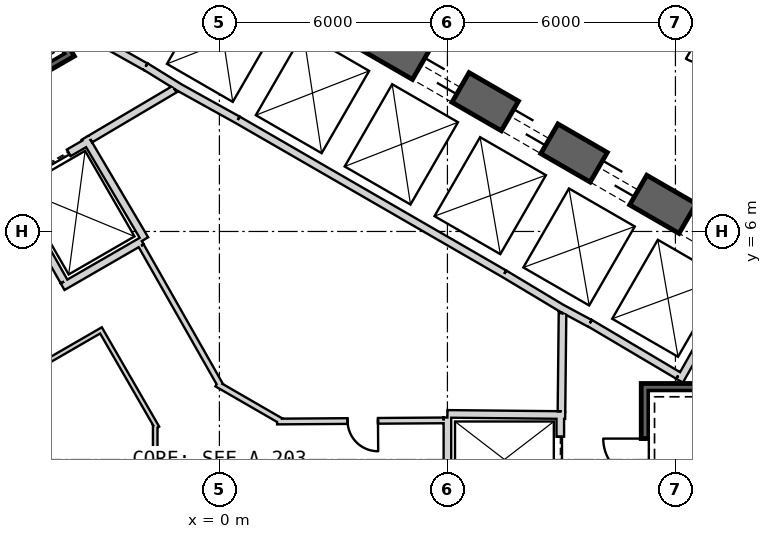
"""IFC4 building model, lengths in metres.
Left out: names, types, materials, properties, quantities, classifications, styles, units other than length and angle.
Written with IfcOpenShell. Run it as: python <this file> out.ifc"""

import sys

from ifc_helpers import new_model, si_unit, direction, frame, frame_2d, origin, place, context, subcontext, project, spatial, rectangle, extrude, element, fill, save


model = new_model("IFC4")
c1 = context("Model", 3, precision=1e-05, world=origin(), true_north=direction((0.0, 1.0)))
c2 = subcontext(c1, "Body", "Model", "MODEL_VIEW")
j1 = project(units=[si_unit("LENGTHUNIT", "METRE"), si_unit("PLANEANGLEUNIT", "RADIAN")], contexts=[c1])
p1 = place(None, origin())
s1 = spatial("IfcSite", under=j1, at=p1, CompositionType="ELEMENT")
p2 = place(p1, origin())
s2 = spatial("IfcBuilding", under=s1, at=p2, CompositionType="ELEMENT")
p3 = place(p2, origin())
s3 = spatial("IfcBuildingStorey", under=s2, at=p3, CompositionType="ELEMENT", Elevation=0.0)
p4 = place(p3, frame((19.475, 2.208, 0.0), z_axis=(0.0, 0.0, 1.0), x_axis=(-0.866028369851, 0.499994862586, 0.0)))
e1 = element("IfcWall", 1, at=p4, inside=s3, PredefinedType="SHEAR", context=c2, shape_type="SweptSolid", body=[
    extrude(rectangle(XDim=31.523, YDim=0.9, at=frame_2d((15.762, 0.0))), origin(), (0.0, 0.0, 1.0), 9.0),
])
p5 = place(p4, frame((7.062, 0.0, 0.0)))
e2 = element("IfcOpeningElement", 2, at=p5, cuts=e1, PredefinedType="OPENING", context=c2, shape_type="SweptSolid", body=[
    extrude(rectangle(XDim=1.2, YDim=2.4, at=frame_2d((0.6, 1.2))), frame((0.0, 0.46, 0.0), z_axis=(0.0, -1.0, 0.0), x_axis=(1.0, 0.0, 0.0)), (0.0, 0.0, 1.0), 0.92),
])
p6 = place(p4, frame((9.762, 0.0, 0.0)))
e3 = element("IfcOpeningElement", 3, at=p6, cuts=e1, PredefinedType="OPENING", context=c2, shape_type="SweptSolid", body=[
    extrude(rectangle(XDim=1.2, YDim=2.4, at=frame_2d((0.6, 1.2))), frame((0.0, 0.46, 0.0), z_axis=(0.0, -1.0, 0.0), x_axis=(1.0, 0.0, 0.0)), (0.0, 0.0, 1.0), 0.92),
])
p7 = place(p4, frame((12.462, 0.0, 0.0)))
e4 = element("IfcOpeningElement", 4, at=p7, cuts=e1, PredefinedType="OPENING", context=c2, shape_type="SweptSolid", body=[
    extrude(rectangle(XDim=1.2, YDim=2.4, at=frame_2d((0.6, 1.2))), frame((0.0, 0.46, 0.0), z_axis=(0.0, -1.0, 0.0), x_axis=(1.0, 0.0, 0.0)), (0.0, 0.0, 1.0), 0.92),
])
p8 = place(p4, frame((15.162, 0.0, 0.0)))
e5 = element("IfcOpeningElement", 5, at=p8, cuts=e1, PredefinedType="OPENING", context=c2, shape_type="SweptSolid", body=[
    extrude(rectangle(XDim=1.2, YDim=2.4, at=frame_2d((0.6, 1.2))), frame((0.0, 0.46, 0.0), z_axis=(0.0, -1.0, 0.0), x_axis=(1.0, 0.0, 0.0)), (0.0, 0.0, 1.0), 0.92),
])
p9 = place(p4, frame((17.862, 0.0, 0.0)))
e6 = element("IfcOpeningElement", 6, at=p9, cuts=e1, PredefinedType="OPENING", context=c2, shape_type="SweptSolid", body=[
    extrude(rectangle(XDim=1.2, YDim=2.4, at=frame_2d((0.6, 1.2))), frame((0.0, 0.46, 0.0), z_axis=(0.0, -1.0, 0.0), x_axis=(1.0, 0.0, 0.0)), (0.0, 0.0, 1.0), 0.92),
])
p10 = place(p4, frame((20.562, 0.0, 0.0)))
e7 = element("IfcOpeningElement", 7, at=p10, cuts=e1, PredefinedType="OPENING", context=c2, shape_type="SweptSolid", body=[
    extrude(rectangle(XDim=1.2, YDim=2.4, at=frame_2d((0.6, 1.2))), frame((0.0, 0.46, 0.0), z_axis=(0.0, -1.0, 0.0), x_axis=(1.0, 0.0, 0.0)), (0.0, 0.0, 1.0), 0.92),
])
p11 = place(p4, frame((23.262, 0.0, 0.0)))
e8 = element("IfcOpeningElement", 8, at=p11, cuts=e1, PredefinedType="OPENING", context=c2, shape_type="SweptSolid", body=[
    extrude(rectangle(XDim=1.2, YDim=2.4, at=frame_2d((0.6, 1.2))), frame((0.0, 0.46, 0.0), z_axis=(0.0, -1.0, 0.0), x_axis=(1.0, 0.0, 0.0)), (0.0, 0.0, 1.0), 0.92),
])
p12 = place(p4, frame((3.612, 0.0, 0.0)))
e9 = element("IfcOpeningElement", 9, at=p12, cuts=e1, PredefinedType="OPENING", context=c2, shape_type="SweptSolid", body=[
    extrude(rectangle(XDim=1.2, YDim=2.4, at=frame_2d((0.6, 1.2))), frame((0.0, 0.46, 0.0), z_axis=(0.0, -1.0, 0.0), x_axis=(1.0, 0.0, 0.0)), (0.0, 0.0, 1.0), 0.92),
])
p13 = place(p4, frame((26.712, 0.0, 0.0)))
e10 = element("IfcOpeningElement", 10, at=p13, cuts=e1, PredefinedType="OPENING", context=c2, shape_type="SweptSolid", body=[
    extrude(rectangle(XDim=1.2, YDim=2.4, at=frame_2d((0.6, 1.2))), frame((0.0, 0.46, 0.0), z_axis=(0.0, -1.0, 0.0), x_axis=(1.0, 0.0, 0.0)), (0.0, 0.0, 1.0), 0.92),
])
p14 = place(p3, frame((7.497, 4.886, 0.0), z_axis=(0.0, 0.0, 1.0), x_axis=(-0.866030989016, 0.499990325971, 0.0)))
e11 = element("IfcWall", 11, at=p14, inside=s3, PredefinedType="PLUMBINGWALL", context=c2, shape_type="SweptSolid", body=[
    extrude(rectangle(XDim=8.1, YDim=0.2, at=frame_2d((4.05, 0.0))), origin(), (0.0, 0.0, 1.0), 8.7),
])
p15 = place(p3, frame((12.11, 2.073, 0.0), z_axis=(0.0, 0.0, 1.0), x_axis=(0.49196600604, 0.870614408852, 0.0)))
e12 = element("IfcWall", 12, at=p15, inside=s3, PredefinedType="PLUMBINGWALL", context=c2, shape_type="SweptSolid", body=[
    extrude(rectangle(XDim=3.35, YDim=0.2, at=frame_2d((1.675, 0.0))), origin(), (0.0, 0.0, 1.0), 8.7),
])
p16 = place(p3, frame((12.073, 2.211, 0.0), z_axis=(0.0, 0.0, 1.0), x_axis=(-0.860438357912, 0.509554542943, 0.0)))
e13 = element("IfcWall", 13, at=p16, inside=s3, PredefinedType="PLUMBINGWALL", context=c2, shape_type="SweptSolid", body=[
    extrude(rectangle(XDim=2.7, YDim=0.2, at=frame_2d((1.35, 0.0))), origin(), (0.0, 0.0, 1.0), 8.7),
])
p17 = place(p3, frame((9.748, 3.583, 0.0), z_axis=(0.0, 0.0, 1.0), x_axis=(-0.880917147855, 0.473270513147, 0.0)))
e14 = element("IfcWall", 14, at=p17, inside=s3, PredefinedType="PLUMBINGWALL", context=c2, shape_type="SweptSolid", body=[
    extrude(rectangle(XDim=0.878, YDim=0.2, at=frame_2d((0.439, 0.0))), origin(), (0.0, 0.0, 1.0), 8.7),
])
p18 = place(p3, frame((9.079, 3.937, 0.0), z_axis=(0.0, 0.0, 1.0), x_axis=(-0.857516281273, 0.51445682749, 0.0)))
e15 = element("IfcWall", 15, at=p18, inside=s3, PredefinedType="PLUMBINGWALL", context=c2, shape_type="SweptSolid", body=[
    extrude(rectangle(XDim=1.845, YDim=0.2, at=frame_2d((0.922, 0.0))), origin(), (0.0, 0.0, 1.0), 8.7),
])
p19 = place(p3, frame((-1.941, 10.339, 0.0), z_axis=(0.0, 0.0, 1.0), x_axis=(0.850216889117, -0.526432561171, 0.0)))
e16 = element("IfcWall", 16, at=p19, inside=s3, PredefinedType="PLUMBINGWALL", context=c2, shape_type="SweptSolid", body=[
    extrude(rectangle(XDim=1.078, YDim=0.2, at=frame_2d((0.539, 0.0))), origin(), (0.0, 0.0, 1.0), 8.7),
])
p20 = place(p3, frame((0.483, 8.936, 0.0), z_axis=(0.0, 0.0, 1.0), x_axis=(-0.874269620932, 0.485440655401, 0.0)))
e17 = element("IfcWall", 17, at=p20, inside=s3, PredefinedType="PLUMBINGWALL", context=c2, shape_type="SweptSolid", body=[
    extrude(rectangle(XDim=1.845, YDim=0.2, at=frame_2d((0.922, 0.0))), origin(), (0.0, 0.0, 1.0), 8.7),
])
p21 = place(p3, frame((-4.296, 11.659, 0.0), z_axis=(0.0, 0.0, 1.0), x_axis=(0.871534483978, -0.490334215854, 0.0)))
e18 = element("IfcWall", 18, at=p21, inside=s3, PredefinedType="PLUMBINGWALL", context=c2, shape_type="SweptSolid", body=[
    extrude(rectangle(XDim=2.7, YDim=0.2, at=frame_2d((1.35, 0.0))), origin(), (0.0, 0.0, 1.0), 8.7),
])
p22 = place(p3, frame((19.2, 1.9, -0.4), z_axis=(0.0, 0.0, 1.0), x_axis=(-1.0, 0.0, 0.0)))
e19 = element("IfcWall", 19, at=p22, inside=s3, PredefinedType="SHEAR", context=c2, shape_type="SweptSolid", body=[
    extrude(rectangle(XDim=8.1, YDim=0.2, at=frame_2d((4.05, 0.0))), origin(), (0.0, 0.0, 1.0), 9.1),
])
p23 = place(p3, frame((11.2, -1.8, -0.4), z_axis=(0.0, 0.0, 1.0), x_axis=(0.0, 1.0, 0.0)))
e20 = element("IfcWall", 20, at=p23, inside=s3, PredefinedType="SHEAR", context=c2, shape_type="SweptSolid", body=[
    extrude(rectangle(XDim=3.6, YDim=0.2, at=frame_2d((1.8, 0.0))), origin(), (0.0, 0.0, 1.0), 9.1),
])
p24 = place(p23, frame((1.25, 0.0, 0.4)))
e21 = element("IfcOpeningElement", 21, at=p24, cuts=e20, PredefinedType="OPENING", context=c2, shape_type="SweptSolid", body=[
    extrude(rectangle(XDim=1.1, YDim=2.1, at=frame_2d((0.55, 1.05))), frame((0.0, 0.11, 0.0), z_axis=(0.0, -1.0, 0.0), x_axis=(1.0, 0.0, 0.0)), (0.0, 0.0, 1.0), 0.22),
])
p25 = place(p3, frame((8.97, 1.2, 0.0), z_axis=(0.0, 0.0, 1.0), x_axis=(0.0, -1.0, 0.0)))
e22 = element("IfcWall", 22, at=p25, inside=s3, PredefinedType="PLUMBINGWALL", context=c2, shape_type="SweptSolid", body=[
    extrude(rectangle(XDim=2.4, YDim=0.2, at=frame_2d((1.2, 0.0))), origin(), (0.0, 0.0, 1.0), 8.7),
])
p26 = place(p25, frame((0.6, 0.0, 0.0)))
e23 = element("IfcOpeningElement", 23, at=p26, cuts=e22, PredefinedType="OPENING", context=c2, shape_type="SweptSolid", body=[
    extrude(rectangle(XDim=1.2, YDim=2.4, at=frame_2d((0.6, 1.2))), frame((0.0, 0.11, 0.0), z_axis=(0.0, -1.0, 0.0), x_axis=(1.0, 0.0, 0.0)), (0.0, 0.0, 1.0), 0.22),
])
p27 = place(p3, frame((6.0, 1.2, 0.0), z_axis=(0.0, 0.0, 1.0), x_axis=(0.999949988, -0.010001074852, 0.0)))
e24 = element("IfcWall", 24, at=p27, inside=s3, PredefinedType="PLUMBINGWALL", context=c2, shape_type="SweptSolid", body=[
    extrude(rectangle(XDim=3.1, YDim=0.2, at=frame_2d((1.55, 0.0))), origin(), (0.0, 0.0, 1.0), 8.7),
])
p28 = place(p3, frame((6.0, -1.1, 0.0), z_axis=(0.0, 0.0, 1.0), x_axis=(0.0, 1.0, 0.0)))
e25 = element("IfcWall", 25, at=p28, inside=s3, PredefinedType="PLUMBINGWALL", context=c2, shape_type="SweptSolid", body=[
    extrude(rectangle(XDim=2.205, YDim=0.2, at=frame_2d((1.102, 0.0))), origin(), (0.0, 0.0, 1.0), 8.7),
])
p29 = place(p3, frame((-7.854, 17.405, -0.4), z_axis=(0.0, 0.0, 1.0), x_axis=(0.499997992926, -0.866026562566, 0.0)))
e26 = element("IfcWall", 26, at=p29, inside=s3, PredefinedType="SHEAR", context=c2, shape_type="SweptSolid", body=[
    extrude(rectangle(XDim=7.9, YDim=0.2, at=frame_2d((3.95, 0.0))), origin(), (0.0, 0.0, 1.0), 9.1),
])
p30 = place(p3, frame((-7.159, 8.8, -0.4), z_axis=(0.0, 0.0, 1.0), x_axis=(0.866047807691, 0.499961193289, 0.0)))
e27 = element("IfcWall", 27, at=p30, inside=s3, PredefinedType="SHEAR", context=c2, shape_type="SweptSolid", body=[
    extrude(rectangle(XDim=3.6, YDim=0.2, at=frame_2d((1.8, 0.0))), origin(), (0.0, 0.0, 1.0), 9.1),
])
p31 = place(p30, frame((1.25, 0.0, 0.4)))
e28 = element("IfcOpeningElement", 28, at=p31, cuts=e27, PredefinedType="OPENING", context=c2, shape_type="SweptSolid", body=[
    extrude(rectangle(XDim=1.1, YDim=2.1, at=frame_2d((0.55, 1.05))), frame((0.0, 0.11, 0.0), z_axis=(0.0, -1.0, 0.0), x_axis=(1.0, 0.0, 0.0)), (0.0, 0.0, 1.0), 0.22),
])
p32 = place(p3, frame((-5.524, 7.168, 0.0), z_axis=(0.0, 0.0, 1.0), x_axis=(0.866024647952, 0.500001309137, 0.0)))
e29 = element("IfcWall", 29, at=p32, inside=s3, PredefinedType="PLUMBINGWALL", context=c2, shape_type="SweptSolid", body=[
    extrude(rectangle(XDim=2.4, YDim=0.2, at=frame_2d((1.2, 0.0))), origin(), (0.0, 0.0, 1.0), 8.7),
])
p33 = place(p32, frame((0.6, 0.0, 0.0)))
e30 = element("IfcOpeningElement", 30, at=p33, cuts=e29, PredefinedType="OPENING", context=c2, shape_type="SweptSolid", body=[
    extrude(rectangle(XDim=1.2, YDim=2.4, at=frame_2d((0.6, 1.2))), frame((0.0, 0.11, 0.0), z_axis=(0.0, -1.0, 0.0), x_axis=(1.0, 0.0, 0.0)), (0.0, 0.0, 1.0), 0.22),
])
p34 = place(p3, frame((-3.538, 8.465, 0.0), z_axis=(0.0, 0.0, 1.0), x_axis=(0.508647062354, -0.860975125052, 0.0)))
e31 = element("IfcWall", 31, at=p34, inside=s3, PredefinedType="PLUMBINGWALL", context=c2, shape_type="SweptSolid", body=[
    extrude(rectangle(XDim=3.1, YDim=0.2, at=frame_2d((1.55, 0.0))), origin(), (0.0, 0.0, 1.0), 8.7),
])
p35 = place(p3, frame((-2.043, 5.748, 0.0), z_axis=(0.0, 0.0, 1.0), x_axis=(-0.866035096217, -0.499983211839, 0.0)))
e32 = element("IfcWall", 32, at=p35, inside=s3, PredefinedType="PLUMBINGWALL", context=c2, shape_type="SweptSolid", body=[
    extrude(rectangle(XDim=2.404, YDim=0.2, at=frame_2d((1.202, 0.0))), origin(), (0.0, 0.0, 1.0), 8.7),
])
p36 = place(p3, frame((-5.562, 7.296, 0.0), z_axis=(0.0, 0.0, 1.0), x_axis=(0.49134651263, -0.870964180966, 0.0)))
e33 = element("IfcWall", 33, at=p36, inside=s3, PredefinedType="PLUMBINGWALL", context=c2, shape_type="SweptSolid", body=[
    extrude(rectangle(XDim=3.0, YDim=0.2, at=frame_2d((1.5, 0.0))), origin(), (0.0, 0.0, 1.0), 8.7),
])
p37 = place(p3, frame((9.001, 1.27, 0.0), z_axis=(0.0, 0.0, 1.0), x_axis=(0.010784614026, 0.999941844359, 0.0)))
e34 = element("IfcWall", 34, at=p37, inside=s3, PredefinedType="PARTITIONING", context=c2, shape_type="SweptSolid", body=[
    extrude(rectangle(XDim=2.581, YDim=0.2, at=frame_2d((1.291, 0.0))), origin(), (0.0, 0.0, 1.0), 8.7),
])
p38 = place(p3, frame((-1.18, 9.744, 0.0), z_axis=(0.0, 0.0, 1.0), x_axis=(-0.860615607571, -0.509255118781, 0.0)))
e35 = element("IfcWall", 35, at=p38, inside=s3, PredefinedType="PARTITIONING", context=c2, shape_type="SweptSolid", body=[
    extrude(rectangle(XDim=2.581, YDim=0.2, at=frame_2d((1.29, 0.0))), origin(), (0.0, 0.0, 1.0), 8.7),
])
p39 = place(p3, frame((1.518, 0.999, 0.0), z_axis=(0.0, 0.0, 1.0), x_axis=(0.999976903524, 0.006796500403, 0.0)))
e36 = element("IfcWall", 36, at=p39, inside=s3, PredefinedType="PLUMBINGWALL", context=c2, shape_type="SweptSolid", body=[
    extrude(rectangle(XDim=4.382, YDim=0.15, at=frame_2d((2.191, 0.0))), origin(), (0.0, 0.0, 1.0), 8.7),
])
p40 = place(p39, frame((1.855, 0.0, 0.0)))
e37 = element("IfcOpeningElement", 37, at=p40, cuts=e36, PredefinedType="OPENING", context=c2, shape_type="SweptSolid", body=[
    extrude(rectangle(XDim=0.8, YDim=2.1, at=frame_2d((0.4, 1.05))), frame((0.0, 0.085, 0.0), z_axis=(0.0, -1.0, 0.0), x_axis=(1.0, 0.0, 0.0)), (0.0, 0.0, 1.0), 0.17),
])
p41 = place(p3, frame((-0.067, 1.989, 0.0), z_axis=(0.0, 0.0, 1.0), x_axis=(0.865981695925, -0.500075696594, 0.0)))
e38 = element("IfcWall", 38, at=p41, inside=s3, PredefinedType="PLUMBINGWALL", context=c2, shape_type="SweptSolid", body=[
    extrude(rectangle(XDim=1.954, YDim=0.15, at=frame_2d((0.977, 0.0))), origin(), (0.0, 0.0, 1.0), 8.7),
])
p42 = place(p3, frame((-2.059, 5.624, 0.0), z_axis=(0.0, 0.0, 1.0), x_axis=(0.494149180773, -0.869377125959, 0.0)))
e39 = element("IfcWall", 39, at=p42, inside=s3, PredefinedType="PLUMBINGWALL", context=c2, shape_type="SweptSolid", body=[
    extrude(rectangle(XDim=4.231, YDim=0.15, at=frame_2d((2.116, 0.0))), origin(), (0.0, 0.0, 1.0), 8.7),
])
p43 = place(p3, frame((-3.064, 3.427, 0.0), z_axis=(0.0, 0.0, 1.0), x_axis=(-0.866087547558, -0.499892348375, 0.0)))
e40 = element("IfcWall", 40, at=p43, inside=s3, PredefinedType="PARTITIONING", context=c2, shape_type="SweptSolid", body=[
    extrude(rectangle(XDim=1.7, YDim=0.12, at=frame_2d((0.85, 0.0))), origin(), (0.0, 0.0, 1.0), 8.7),
])
p44 = place(p3, frame((-1.637, 0.835, 0.0), z_axis=(0.0, 0.0, 1.0), x_axis=(-0.499980071345, 0.866036909293, 0.0)))
e41 = element("IfcWall", 41, at=p44, inside=s3, PredefinedType="PARTITIONING", context=c2, shape_type="SweptSolid", body=[
    extrude(rectangle(XDim=2.898, YDim=0.12, at=frame_2d((1.449, 0.0))), origin(), (0.0, 0.0, 1.0), 8.7),
])
p45 = place(p3, frame((-1.689, -1.029, 0.0), z_axis=(0.0, 0.0, 1.0), x_axis=(0.0, 1.0, 0.0)))
e42 = element("IfcWall", 42, at=p45, inside=s3, PredefinedType="PARTITIONING", context=c2, shape_type="SweptSolid", body=[
    extrude(rectangle(XDim=1.935, YDim=0.12, at=frame_2d((0.968, 0.0))), origin(), (0.0, 0.0, 1.0), 8.7),
])
p46 = place(p3, frame((18.544, 7.965, 0.0), z_axis=(0.0, 0.0, 1.0), x_axis=(-0.866028877706, 0.499993982943, 0.0)))
e43 = element("IfcWall", 43, at=p46, inside=s3, PredefinedType="PARTITIONING", context=c2, shape_type="SweptSolid", body=[
    extrude(rectangle(XDim=24.154, YDim=0.12, at=frame_2d((12.077, 0.0))), origin(), (0.0, 0.0, 1.0), 8.08),
])
p47 = place(p46, frame((17.517, 0.0, 0.0)))
e44 = element("IfcOpeningElement", 44, at=p47, cuts=e43, PredefinedType="OPENING", context=c2, shape_type="SweptSolid", body=[
    extrude(rectangle(XDim=1.8, YDim=2.1, at=frame_2d((0.9, 1.05))), frame((0.0, 0.07, 0.0), z_axis=(0.0, -1.0, 0.0), x_axis=(1.0, 0.0, 0.0)), (0.0, 0.0, 1.0), 0.14),
])
p48 = place(p46, frame((11.117, 0.0, 0.0)))
e45 = element("IfcOpeningElement", 45, at=p48, cuts=e43, PredefinedType="OPENING", context=c2, shape_type="SweptSolid", body=[
    extrude(rectangle(XDim=1.8, YDim=2.1, at=frame_2d((0.9, 1.05))), frame((0.0, 0.07, 0.0), z_axis=(0.0, -1.0, 0.0), x_axis=(1.0, 0.0, 0.0)), (0.0, 0.0, 1.0), 0.14),
])
p49 = place(p46, frame((4.917, 0.0, 0.0)))
e46 = element("IfcOpeningElement", 46, at=p49, cuts=e43, PredefinedType="OPENING", context=c2, shape_type="SweptSolid", body=[
    extrude(rectangle(XDim=1.8, YDim=2.1, at=frame_2d((0.9, 1.05))), frame((0.0, 0.07, 0.0), z_axis=(0.0, -1.0, 0.0), x_axis=(1.0, 0.0, 0.0)), (0.0, 0.0, 1.0), 0.14),
])
p50 = place(p24, origin())
e47 = element("IfcDoor", 47, at=p50, inside=s3, OperationType="SINGLE_SWING_RIGHT", PredefinedType="USERDEFINED", context=c2, shape_type="SweptSolid", body=[
    extrude(rectangle(XDim=1.1, YDim=2.1, at=frame_2d((0.55, 1.05))), frame((0.0, 0.025, 0.0), z_axis=(0.0, -1.0, 0.0), x_axis=(1.0, 0.0, 0.0)), (0.0, 0.0, 1.0), 0.05),
])
fill(e21, e47)
p51 = place(p26, origin())
e48 = element("IfcDoor", 48, at=p51, inside=s3, OperationType="SLIDING_TO_LEFT", PredefinedType="USERDEFINED", context=c2, shape_type="SweptSolid", body=[
    extrude(rectangle(XDim=1.2, YDim=2.4, at=frame_2d((0.6, 1.2))), frame((0.0, 0.025, 0.0), z_axis=(0.0, -1.0, 0.0), x_axis=(1.0, 0.0, 0.0)), (0.0, 0.0, 1.0), 0.05),
])
fill(e23, e48)
p52 = place(p33, origin())
e49 = element("IfcDoor", 49, at=p52, inside=s3, OperationType="SLIDING_TO_LEFT", PredefinedType="USERDEFINED", context=c2, shape_type="SweptSolid", body=[
    extrude(rectangle(XDim=1.2, YDim=2.4, at=frame_2d((0.6, 1.2))), frame((0.0, 0.025, 0.0), z_axis=(0.0, -1.0, 0.0), x_axis=(1.0, 0.0, 0.0)), (0.0, 0.0, 1.0), 0.05),
])
fill(e30, e49)
p53 = place(p40, origin())
e50 = element("IfcDoor", 50, at=p53, inside=s3, OperationType="SINGLE_SWING_RIGHT", PredefinedType="USERDEFINED", context=c2, shape_type="SweptSolid", body=[
    extrude(rectangle(XDim=0.8, YDim=2.1, at=frame_2d((0.4, 1.05))), frame((0.0, 0.025, 0.0), z_axis=(0.0, -1.0, 0.0), x_axis=(1.0, 0.0, 0.0)), (0.0, 0.0, 1.0), 0.05),
])
fill(e37, e50)
p54 = place(p5, origin())
e51 = element("IfcDoor", 51, at=p54, inside=s3, OperationType="SLIDING_TO_LEFT", PredefinedType="USERDEFINED", context=c2, shape_type="SweptSolid", body=[
    extrude(rectangle(XDim=1.2, YDim=2.4, at=frame_2d((0.6, 1.2))), frame((0.0, 0.025, 0.0), z_axis=(0.0, -1.0, 0.0), x_axis=(1.0, 0.0, 0.0)), (0.0, 0.0, 1.0), 0.05),
])
fill(e2, e51)
p55 = place(p6, origin())
e52 = element("IfcDoor", 52, at=p55, inside=s3, OperationType="SLIDING_TO_LEFT", PredefinedType="USERDEFINED", context=c2, shape_type="SweptSolid", body=[
    extrude(rectangle(XDim=1.2, YDim=2.4, at=frame_2d((0.6, 1.2))), frame((0.0, 0.025, 0.0), z_axis=(0.0, -1.0, 0.0), x_axis=(1.0, 0.0, 0.0)), (0.0, 0.0, 1.0), 0.05),
])
fill(e3, e52)
p56 = place(p7, origin())
e53 = element("IfcDoor", 53, at=p56, inside=s3, OperationType="SLIDING_TO_LEFT", PredefinedType="USERDEFINED", context=c2, shape_type="SweptSolid", body=[
    extrude(rectangle(XDim=1.2, YDim=2.4, at=frame_2d((0.6, 1.2))), frame((0.0, 0.025, 0.0), z_axis=(0.0, -1.0, 0.0), x_axis=(1.0, 0.0, 0.0)), (0.0, 0.0, 1.0), 0.05),
])
fill(e4, e53)
p57 = place(p8, origin())
e54 = element("IfcDoor", 54, at=p57, inside=s3, OperationType="SLIDING_TO_LEFT", PredefinedType="USERDEFINED", context=c2, shape_type="SweptSolid", body=[
    extrude(rectangle(XDim=1.2, YDim=2.4, at=frame_2d((0.6, 1.2))), frame((0.0, 0.025, 0.0), z_axis=(0.0, -1.0, 0.0), x_axis=(1.0, 0.0, 0.0)), (0.0, 0.0, 1.0), 0.05),
])
fill(e5, e54)
save(model, sys.argv[1])
